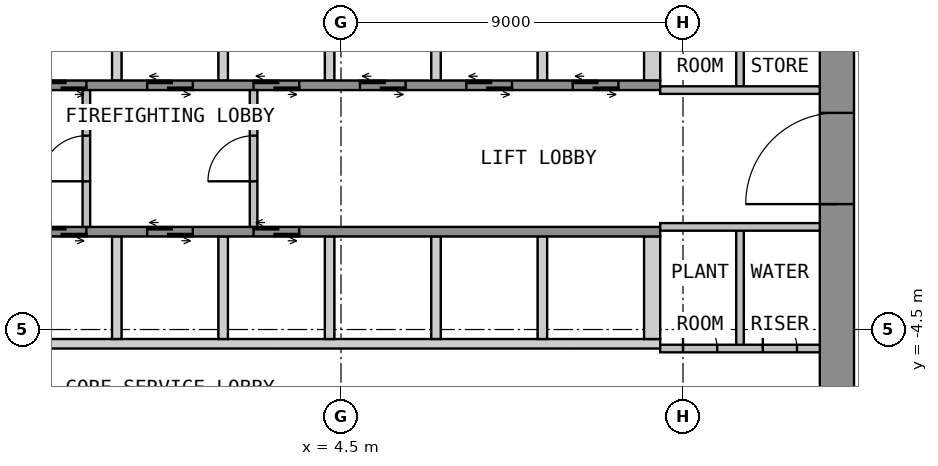
"""IFC4 building model, lengths in metres.
Left out: names, types, materials, properties, quantities, classifications, styles, units other than length and angle.
Written with IfcOpenShell. Run it as: python <this file> out.ifc"""

import sys

from ifc_helpers import new_model, si_unit, direction, frame, frame_2d, origin, place, context, subcontext, project, spatial, polyline, rectangle, outline, extrude, element, fill, save


model = new_model("IFC4")
c1 = context("Model", 3, precision=1e-05, world=origin(), true_north=direction((0.0, 1.0)))
c2 = subcontext(c1, "Body", "Model", "MODEL_VIEW")
j1 = project(units=[si_unit("LENGTHUNIT", "METRE"), si_unit("PLANEANGLEUNIT", "RADIAN")], contexts=[c1])
p1 = place(None, origin())
s1 = spatial("IfcSite", under=j1, at=p1, CompositionType="ELEMENT")
p2 = place(p1, origin())
s2 = spatial("IfcBuilding", under=s1, at=p2, CompositionType="ELEMENT")
p3 = place(p2, frame((0.0, 0.0, 81.3)))
s3 = spatial("IfcBuildingStorey", under=s2, at=p3, CompositionType="ELEMENT", Elevation=81.3)
p4 = place(p3, frame((17.55, -12.6, 0.0), z_axis=(0.0, 0.0, 1.0), x_axis=(0.0, 1.0, 0.0)))
e1 = element("IfcWall", 1, at=p4, inside=s3, PredefinedType="SHEAR", context=c2, shape_type="SweptSolid", body=[
    extrude(rectangle(XDim=25.2, YDim=0.9, at=frame_2d((12.6, 0.0))), origin(), (0.0, 0.0, 1.0), 3.525),
])
p5 = place(p4, frame((11.4, 0.0, 0.0)))
e2 = element("IfcOpeningElement", 2, at=p5, cuts=e1, PredefinedType="OPENING", context=c2, shape_type="SweptSolid", body=[
    extrude(rectangle(XDim=2.4, YDim=2.1, at=frame_2d((1.2, 1.05))), frame((0.0, 0.46, 0.0), z_axis=(0.0, -1.0, 0.0), x_axis=(1.0, 0.0, 0.0)), (0.0, 0.0, 1.0), 0.92),
])
p6 = place(p3, origin())
e3 = element("IfcWall", 3, at=p6, inside=s3, PredefinedType="SHEAR", context=c2, shape_type="SweptSolid", body=[
    extrude(outline(polyline([(-1.525, 2.05), (-1.275, 2.05), (-1.275, 4.75), (-1.525, 4.75), (-1.525, 2.05)])), origin(), (0.0, 0.0, 1.0), 3.525),
])
p7 = place(p3, origin())
e4 = element("IfcWall", 4, at=p7, inside=s3, PredefinedType="SHEAR", context=c2, shape_type="SweptSolid", body=[
    extrude(outline(polyline([(1.275, 2.05), (1.525, 2.05), (1.525, 4.75), (1.275, 4.75), (1.275, 2.05)])), origin(), (0.0, 0.0, 1.0), 3.525),
])
p8 = place(p3, origin())
e5 = element("IfcWall", 5, at=p8, inside=s3, PredefinedType="SHEAR", context=c2, shape_type="SweptSolid", body=[
    extrude(outline(polyline([(4.075, 2.05), (4.325, 2.05), (4.325, 4.75), (4.075, 4.75), (4.075, 2.05)])), origin(), (0.0, 0.0, 1.0), 3.525),
])
p9 = place(p3, origin())
e6 = element("IfcWall", 6, at=p9, inside=s3, PredefinedType="SHEAR", context=c2, shape_type="SweptSolid", body=[
    extrude(outline(polyline([(6.875, 2.05), (7.125, 2.05), (7.125, 4.75), (6.875, 4.75), (6.875, 2.05)])), origin(), (0.0, 0.0, 1.0), 3.525),
])
p10 = place(p3, origin())
e7 = element("IfcWall", 7, at=p10, inside=s3, PredefinedType="SHEAR", context=c2, shape_type="SweptSolid", body=[
    extrude(outline(polyline([(9.675, 2.05), (9.925, 2.05), (9.925, 4.75), (9.675, 4.75), (9.675, 2.05)])), origin(), (0.0, 0.0, 1.0), 3.525),
])
p11 = place(p3, origin())
e8 = element("IfcWall", 8, at=p11, inside=s3, PredefinedType="SHEAR", context=c2, shape_type="SweptSolid", body=[
    extrude(outline(polyline([(12.475, 2.05), (12.9, 2.05), (12.9, 4.75), (12.475, 4.75), (12.475, 2.05)])), origin(), (0.0, 0.0, 1.0), 3.525),
])
p12 = place(p3, frame((-12.9, 1.925, 0.0), z_axis=(0.0, 0.0, 1.0), x_axis=(1.0, 0.0, 0.0)))
e9 = element("IfcWall", 9, at=p12, inside=s3, PredefinedType="SHEAR", context=c2, shape_type="SweptSolid", body=[
    extrude(rectangle(XDim=25.8, YDim=0.25, at=frame_2d((12.9, 0.0))), origin(), (0.0, 0.0, 1.0), 3.525),
])
p13 = place(p12, frame((9.5, 0.0, 0.0)))
e10 = element("IfcOpeningElement", 10, at=p13, cuts=e9, PredefinedType="OPENING", context=c2, shape_type="SweptSolid", body=[
    extrude(rectangle(XDim=1.2, YDim=2.1, at=frame_2d((0.6, 1.05))), frame((0.0, 0.135, 0.0), z_axis=(0.0, -1.0, 0.0), x_axis=(1.0, 0.0, 0.0)), (0.0, 0.0, 1.0), 0.27),
])
p14 = place(p12, frame((12.3, 0.0, 0.0)))
e11 = element("IfcOpeningElement", 11, at=p14, cuts=e9, PredefinedType="OPENING", context=c2, shape_type="SweptSolid", body=[
    extrude(rectangle(XDim=1.2, YDim=2.1, at=frame_2d((0.6, 1.05))), frame((0.0, 0.135, 0.0), z_axis=(0.0, -1.0, 0.0), x_axis=(1.0, 0.0, 0.0)), (0.0, 0.0, 1.0), 0.27),
])
p15 = place(p12, frame((15.1, 0.0, 0.0)))
e12 = element("IfcOpeningElement", 12, at=p15, cuts=e9, PredefinedType="OPENING", context=c2, shape_type="SweptSolid", body=[
    extrude(rectangle(XDim=1.2, YDim=2.1, at=frame_2d((0.6, 1.05))), frame((0.0, 0.135, 0.0), z_axis=(0.0, -1.0, 0.0), x_axis=(1.0, 0.0, 0.0)), (0.0, 0.0, 1.0), 0.27),
])
p16 = place(p12, frame((17.9, 0.0, 0.0)))
e13 = element("IfcOpeningElement", 13, at=p16, cuts=e9, PredefinedType="OPENING", context=c2, shape_type="SweptSolid", body=[
    extrude(rectangle(XDim=1.2, YDim=2.1, at=frame_2d((0.6, 1.05))), frame((0.0, 0.135, 0.0), z_axis=(0.0, -1.0, 0.0), x_axis=(1.0, 0.0, 0.0)), (0.0, 0.0, 1.0), 0.27),
])
p17 = place(p12, frame((20.7, 0.0, 0.0)))
e14 = element("IfcOpeningElement", 14, at=p17, cuts=e9, PredefinedType="OPENING", context=c2, shape_type="SweptSolid", body=[
    extrude(rectangle(XDim=1.2, YDim=2.1, at=frame_2d((0.6, 1.05))), frame((0.0, 0.135, 0.0), z_axis=(0.0, -1.0, 0.0), x_axis=(1.0, 0.0, 0.0)), (0.0, 0.0, 1.0), 0.27),
])
p18 = place(p12, frame((23.5, 0.0, 0.0)))
e15 = element("IfcOpeningElement", 15, at=p18, cuts=e9, PredefinedType="OPENING", context=c2, shape_type="SweptSolid", body=[
    extrude(rectangle(XDim=1.2, YDim=2.1, at=frame_2d((0.6, 1.05))), frame((0.0, 0.135, 0.0), z_axis=(0.0, -1.0, 0.0), x_axis=(1.0, 0.0, 0.0)), (0.0, 0.0, 1.0), 0.27),
])
p19 = place(p3, origin())
e16 = element("IfcWall", 16, at=p19, inside=s3, PredefinedType="SHEAR", context=c2, shape_type="SweptSolid", body=[
    extrude(outline(polyline([(-12.9, -5.0), (12.9, -5.0), (12.9, -4.75), (-12.9, -4.75), (-12.9, -5.0)])), origin(), (0.0, 0.0, 1.0), 3.525),
])
p20 = place(p3, origin())
e17 = element("IfcWall", 17, at=p20, inside=s3, PredefinedType="SHEAR", context=c2, shape_type="SweptSolid", body=[
    extrude(outline(polyline([(-1.525, -4.75), (-1.275, -4.75), (-1.275, -2.05), (-1.525, -2.05), (-1.525, -4.75)])), origin(), (0.0, 0.0, 1.0), 3.525),
])
p21 = place(p3, origin())
e18 = element("IfcWall", 18, at=p21, inside=s3, PredefinedType="SHEAR", context=c2, shape_type="SweptSolid", body=[
    extrude(outline(polyline([(1.275, -4.75), (1.525, -4.75), (1.525, -2.05), (1.275, -2.05), (1.275, -4.75)])), origin(), (0.0, 0.0, 1.0), 3.525),
])
p22 = place(p3, origin())
e19 = element("IfcWall", 19, at=p22, inside=s3, PredefinedType="SHEAR", context=c2, shape_type="SweptSolid", body=[
    extrude(outline(polyline([(4.075, -4.75), (4.325, -4.75), (4.325, -2.05), (4.075, -2.05), (4.075, -4.75)])), origin(), (0.0, 0.0, 1.0), 3.525),
])
p23 = place(p3, origin())
e20 = element("IfcWall", 20, at=p23, inside=s3, PredefinedType="SHEAR", context=c2, shape_type="SweptSolid", body=[
    extrude(outline(polyline([(6.875, -4.75), (7.125, -4.75), (7.125, -2.05), (6.875, -2.05), (6.875, -4.75)])), origin(), (0.0, 0.0, 1.0), 3.525),
])
p24 = place(p3, origin())
e21 = element("IfcWall", 21, at=p24, inside=s3, PredefinedType="SHEAR", context=c2, shape_type="SweptSolid", body=[
    extrude(outline(polyline([(9.675, -4.75), (9.925, -4.75), (9.925, -2.05), (9.675, -2.05), (9.675, -4.75)])), origin(), (0.0, 0.0, 1.0), 3.525),
])
p25 = place(p3, origin())
e22 = element("IfcWall", 22, at=p25, inside=s3, PredefinedType="SHEAR", context=c2, shape_type="SweptSolid", body=[
    extrude(outline(polyline([(12.475, -4.75), (12.9, -4.75), (12.9, -2.05), (12.475, -2.05), (12.475, -4.75)])), origin(), (0.0, 0.0, 1.0), 3.525),
])
p26 = place(p3, frame((-12.9, -1.925, 0.0), z_axis=(0.0, 0.0, 1.0), x_axis=(1.0, 0.0, 0.0)))
e23 = element("IfcWall", 23, at=p26, inside=s3, PredefinedType="SHEAR", context=c2, shape_type="SweptSolid", body=[
    extrude(rectangle(XDim=25.8, YDim=0.25, at=frame_2d((12.9, 0.0))), origin(), (0.0, 0.0, 1.0), 3.525),
])
p27 = place(p26, frame((1.1, 0.0, 0.0)))
e24 = element("IfcOpeningElement", 24, at=p27, cuts=e23, PredefinedType="OPENING", context=c2, shape_type="SweptSolid", body=[
    extrude(rectangle(XDim=1.2, YDim=2.1, at=frame_2d((0.6, 1.05))), frame((0.0, 0.135, 0.0), z_axis=(0.0, -1.0, 0.0), x_axis=(1.0, 0.0, 0.0)), (0.0, 0.0, 1.0), 0.27),
])
p28 = place(p26, frame((3.9, 0.0, 0.0)))
e25 = element("IfcOpeningElement", 25, at=p28, cuts=e23, PredefinedType="OPENING", context=c2, shape_type="SweptSolid", body=[
    extrude(rectangle(XDim=1.2, YDim=2.1, at=frame_2d((0.6, 1.05))), frame((0.0, 0.135, 0.0), z_axis=(0.0, -1.0, 0.0), x_axis=(1.0, 0.0, 0.0)), (0.0, 0.0, 1.0), 0.27),
])
p29 = place(p26, frame((6.7, 0.0, 0.0)))
e26 = element("IfcOpeningElement", 26, at=p29, cuts=e23, PredefinedType="OPENING", context=c2, shape_type="SweptSolid", body=[
    extrude(rectangle(XDim=1.2, YDim=2.1, at=frame_2d((0.6, 1.05))), frame((0.0, 0.135, 0.0), z_axis=(0.0, -1.0, 0.0), x_axis=(1.0, 0.0, 0.0)), (0.0, 0.0, 1.0), 0.27),
])
p30 = place(p26, frame((9.5, 0.0, 0.0)))
e27 = element("IfcOpeningElement", 27, at=p30, cuts=e23, PredefinedType="OPENING", context=c2, shape_type="SweptSolid", body=[
    extrude(rectangle(XDim=1.2, YDim=2.1, at=frame_2d((0.6, 1.05))), frame((0.0, 0.135, 0.0), z_axis=(0.0, -1.0, 0.0), x_axis=(1.0, 0.0, 0.0)), (0.0, 0.0, 1.0), 0.27),
])
p31 = place(p26, frame((12.3, 0.0, 0.0)))
e28 = element("IfcOpeningElement", 28, at=p31, cuts=e23, PredefinedType="OPENING", context=c2, shape_type="SweptSolid", body=[
    extrude(rectangle(XDim=1.2, YDim=2.1, at=frame_2d((0.6, 1.05))), frame((0.0, 0.135, 0.0), z_axis=(0.0, -1.0, 0.0), x_axis=(1.0, 0.0, 0.0)), (0.0, 0.0, 1.0), 0.27),
])
p32 = place(p26, frame((15.1, 0.0, 0.0)))
e29 = element("IfcOpeningElement", 29, at=p32, cuts=e23, PredefinedType="OPENING", context=c2, shape_type="SweptSolid", body=[
    extrude(rectangle(XDim=1.2, YDim=2.1, at=frame_2d((0.6, 1.05))), frame((0.0, 0.135, 0.0), z_axis=(0.0, -1.0, 0.0), x_axis=(1.0, 0.0, 0.0)), (0.0, 0.0, 1.0), 0.27),
])
p33 = place(p3, frame((-2.2, -1.8, 0.0), z_axis=(0.0, 0.0, 1.0), x_axis=(0.0, 1.0, 0.0)))
e30 = element("IfcWall", 30, at=p33, inside=s3, PredefinedType="PARTITIONING", context=c2, shape_type="SweptSolid", body=[
    extrude(rectangle(XDim=3.6, YDim=0.2, at=frame_2d((1.8, 0.0))), origin(), (0.0, 0.0, 1.0), 3.525),
])
p34 = place(p33, frame((1.2, 0.0, 0.0)))
e31 = element("IfcOpeningElement", 31, at=p34, cuts=e30, PredefinedType="OPENING", context=c2, shape_type="SweptSolid", body=[
    extrude(rectangle(XDim=1.2, YDim=2.1, at=frame_2d((0.6, 1.05))), frame((0.0, 0.11, 0.0), z_axis=(0.0, -1.0, 0.0), x_axis=(1.0, 0.0, 0.0)), (0.0, 0.0, 1.0), 0.22),
])
p35 = place(p3, frame((2.2, -1.8, 0.0), z_axis=(0.0, 0.0, 1.0), x_axis=(0.0, 1.0, 0.0)))
e32 = element("IfcWall", 32, at=p35, inside=s3, PredefinedType="PARTITIONING", context=c2, shape_type="SweptSolid", body=[
    extrude(rectangle(XDim=3.6, YDim=0.2, at=frame_2d((1.8, 0.0))), origin(), (0.0, 0.0, 1.0), 3.525),
])
p36 = place(p35, frame((1.2, 0.0, 0.0)))
e33 = element("IfcOpeningElement", 33, at=p36, cuts=e32, PredefinedType="OPENING", context=c2, shape_type="SweptSolid", body=[
    extrude(rectangle(XDim=1.2, YDim=2.1, at=frame_2d((0.6, 1.05))), frame((0.0, 0.11, 0.0), z_axis=(0.0, -1.0, 0.0), x_axis=(1.0, 0.0, 0.0)), (0.0, 0.0, 1.0), 0.22),
])
p37 = place(p3, frame((15.0, 1.8, 0.0), z_axis=(0.0, 0.0, 1.0), x_axis=(0.0, 1.0, 0.0)))
e34 = element("IfcWall", 34, at=p37, inside=s3, PredefinedType="PARTITIONING", context=c2, shape_type="SweptSolid", body=[
    extrude(rectangle(XDim=3.2, YDim=0.2, at=frame_2d((1.6, 0.0))), origin(), (0.0, 0.0, 1.0), 3.525),
])
p38 = place(p3, frame((12.9, 1.8, 0.0), z_axis=(0.0, 0.0, 1.0), x_axis=(1.0, 0.0, 0.0)))
e35 = element("IfcWall", 35, at=p38, inside=s3, PredefinedType="PARTITIONING", context=c2, shape_type="SweptSolid", body=[
    extrude(rectangle(XDim=4.2, YDim=0.2, at=frame_2d((2.1, 0.0))), origin(), (0.0, 0.0, 1.0), 3.525),
])
p39 = place(p3, frame((15.0, -5.0, 0.0), z_axis=(0.0, 0.0, 1.0), x_axis=(0.0, 1.0, 0.0)))
e36 = element("IfcWall", 36, at=p39, inside=s3, PredefinedType="PARTITIONING", context=c2, shape_type="SweptSolid", body=[
    extrude(rectangle(XDim=3.2, YDim=0.2, at=frame_2d((1.6, 0.0))), origin(), (0.0, 0.0, 1.0), 3.525),
])
p40 = place(p3, frame((12.9, -5.0, 0.0), z_axis=(0.0, 0.0, 1.0), x_axis=(1.0, 0.0, 0.0)))
e37 = element("IfcWall", 37, at=p40, inside=s3, PredefinedType="PARTITIONING", context=c2, shape_type="SweptSolid", body=[
    extrude(rectangle(XDim=4.2, YDim=0.2, at=frame_2d((2.1, 0.0))), origin(), (0.0, 0.0, 1.0), 3.525),
])
p41 = place(p40, frame((0.6, 0.0, 0.0)))
e38 = element("IfcOpeningElement", 38, at=p41, cuts=e37, PredefinedType="OPENING", context=c2, shape_type="SweptSolid", body=[
    extrude(rectangle(XDim=0.9, YDim=2.1, at=frame_2d((0.45, 1.05))), frame((0.0, 0.11, 0.0), z_axis=(0.0, -1.0, 0.0), x_axis=(1.0, 0.0, 0.0)), (0.0, 0.0, 1.0), 0.22),
])
p42 = place(p40, frame((2.7, 0.0, 0.0)))
e39 = element("IfcOpeningElement", 39, at=p42, cuts=e37, PredefinedType="OPENING", context=c2, shape_type="SweptSolid", body=[
    extrude(rectangle(XDim=0.9, YDim=2.1, at=frame_2d((0.45, 1.05))), frame((0.0, 0.11, 0.0), z_axis=(0.0, -1.0, 0.0), x_axis=(1.0, 0.0, 0.0)), (0.0, 0.0, 1.0), 0.22),
])
p43 = place(p3, frame((12.9, -1.8, 0.0), z_axis=(0.0, 0.0, 1.0), x_axis=(1.0, 0.0, 0.0)))
e40 = element("IfcWall", 40, at=p43, inside=s3, PredefinedType="PARTITIONING", context=c2, shape_type="SweptSolid", body=[
    extrude(rectangle(XDim=4.2, YDim=0.2, at=frame_2d((2.1, 0.0))), origin(), (0.0, 0.0, 1.0), 3.525),
])
p44 = place(p5, origin())
e41 = element("IfcDoor", 41, at=p44, inside=s3, OperationType="DOUBLE_DOOR_DOUBLE_SWING", PredefinedType="DOOR", context=c2, shape_type="SweptSolid", body=[
    extrude(rectangle(XDim=2.4, YDim=2.1, at=frame_2d((1.2, 1.05))), frame((0.0, 0.025, 0.0), z_axis=(0.0, -1.0, 0.0), x_axis=(1.0, 0.0, 0.0)), (0.0, 0.0, 1.0), 0.05),
])
fill(e2, e41)
p45 = place(p13, origin())
e42 = element("IfcDoor", 42, at=p45, inside=s3, OperationType="DOUBLE_DOOR_SLIDING", PredefinedType="DOOR", context=c2, shape_type="SweptSolid", body=[
    extrude(rectangle(XDim=1.2, YDim=2.1, at=frame_2d((0.6, 1.05))), frame((0.0, 0.025, 0.0), z_axis=(0.0, -1.0, 0.0), x_axis=(1.0, 0.0, 0.0)), (0.0, 0.0, 1.0), 0.05),
])
fill(e10, e42)
p46 = place(p14, origin())
e43 = element("IfcDoor", 43, at=p46, inside=s3, OperationType="DOUBLE_DOOR_SLIDING", PredefinedType="DOOR", context=c2, shape_type="SweptSolid", body=[
    extrude(rectangle(XDim=1.2, YDim=2.1, at=frame_2d((0.6, 1.05))), frame((0.0, 0.025, 0.0), z_axis=(0.0, -1.0, 0.0), x_axis=(1.0, 0.0, 0.0)), (0.0, 0.0, 1.0), 0.05),
])
fill(e11, e43)
p47 = place(p15, origin())
e44 = element("IfcDoor", 44, at=p47, inside=s3, OperationType="DOUBLE_DOOR_SLIDING", PredefinedType="DOOR", context=c2, shape_type="SweptSolid", body=[
    extrude(rectangle(XDim=1.2, YDim=2.1, at=frame_2d((0.6, 1.05))), frame((0.0, 0.025, 0.0), z_axis=(0.0, -1.0, 0.0), x_axis=(1.0, 0.0, 0.0)), (0.0, 0.0, 1.0), 0.05),
])
fill(e12, e44)
p48 = place(p16, origin())
e45 = element("IfcDoor", 45, at=p48, inside=s3, OperationType="DOUBLE_DOOR_SLIDING", PredefinedType="DOOR", context=c2, shape_type="SweptSolid", body=[
    extrude(rectangle(XDim=1.2, YDim=2.1, at=frame_2d((0.6, 1.05))), frame((0.0, 0.025, 0.0), z_axis=(0.0, -1.0, 0.0), x_axis=(1.0, 0.0, 0.0)), (0.0, 0.0, 1.0), 0.05),
])
fill(e13, e45)
p49 = place(p17, origin())
e46 = element("IfcDoor", 46, at=p49, inside=s3, OperationType="DOUBLE_DOOR_SLIDING", PredefinedType="DOOR", context=c2, shape_type="SweptSolid", body=[
    extrude(rectangle(XDim=1.2, YDim=2.1, at=frame_2d((0.6, 1.05))), frame((0.0, 0.025, 0.0), z_axis=(0.0, -1.0, 0.0), x_axis=(1.0, 0.0, 0.0)), (0.0, 0.0, 1.0), 0.05),
])
fill(e14, e46)
p50 = place(p18, origin())
e47 = element("IfcDoor", 47, at=p50, inside=s3, OperationType="DOUBLE_DOOR_SLIDING", PredefinedType="DOOR", context=c2, shape_type="SweptSolid", body=[
    extrude(rectangle(XDim=1.2, YDim=2.1, at=frame_2d((0.6, 1.05))), frame((0.0, 0.025, 0.0), z_axis=(0.0, -1.0, 0.0), x_axis=(1.0, 0.0, 0.0)), (0.0, 0.0, 1.0), 0.05),
])
fill(e15, e47)
p51 = place(p30, origin())
e48 = element("IfcDoor", 48, at=p51, inside=s3, OperationType="DOUBLE_DOOR_SLIDING", PredefinedType="DOOR", context=c2, shape_type="SweptSolid", body=[
    extrude(rectangle(XDim=1.2, YDim=2.1, at=frame_2d((0.6, 1.05))), frame((0.0, 0.025, 0.0), z_axis=(0.0, -1.0, 0.0), x_axis=(1.0, 0.0, 0.0)), (0.0, 0.0, 1.0), 0.05),
])
fill(e27, e48)
p52 = place(p31, origin())
e49 = element("IfcDoor", 49, at=p52, inside=s3, OperationType="DOUBLE_DOOR_SLIDING", PredefinedType="DOOR", context=c2, shape_type="SweptSolid", body=[
    extrude(rectangle(XDim=1.2, YDim=2.1, at=frame_2d((0.6, 1.05))), frame((0.0, 0.025, 0.0), z_axis=(0.0, -1.0, 0.0), x_axis=(1.0, 0.0, 0.0)), (0.0, 0.0, 1.0), 0.05),
])
fill(e28, e49)
p53 = place(p32, origin())
e50 = element("IfcDoor", 50, at=p53, inside=s3, OperationType="DOUBLE_DOOR_SLIDING", PredefinedType="DOOR", context=c2, shape_type="SweptSolid", body=[
    extrude(rectangle(XDim=1.2, YDim=2.1, at=frame_2d((0.6, 1.05))), frame((0.0, 0.025, 0.0), z_axis=(0.0, -1.0, 0.0), x_axis=(1.0, 0.0, 0.0)), (0.0, 0.0, 1.0), 0.05),
])
fill(e29, e50)
p54 = place(p34, origin())
e51 = element("IfcDoor", 51, at=p54, inside=s3, OperationType="SINGLE_SWING_LEFT", PredefinedType="DOOR", context=c2, shape_type="SweptSolid", body=[
    extrude(rectangle(XDim=1.2, YDim=2.1, at=frame_2d((0.6, 1.05))), frame((0.0, 0.025, 0.0), z_axis=(0.0, -1.0, 0.0), x_axis=(1.0, 0.0, 0.0)), (0.0, 0.0, 1.0), 0.05),
])
fill(e31, e51)
p55 = place(p36, origin())
e52 = element("IfcDoor", 52, at=p55, inside=s3, OperationType="SINGLE_SWING_LEFT", PredefinedType="DOOR", context=c2, shape_type="SweptSolid", body=[
    extrude(rectangle(XDim=1.2, YDim=2.1, at=frame_2d((0.6, 1.05))), frame((0.0, 0.025, 0.0), z_axis=(0.0, -1.0, 0.0), x_axis=(1.0, 0.0, 0.0)), (0.0, 0.0, 1.0), 0.05),
])
fill(e33, e52)
p56 = place(p41, origin())
e53 = element("IfcDoor", 53, at=p56, inside=s3, OperationType="SINGLE_SWING_LEFT", PredefinedType="DOOR", context=c2, shape_type="SweptSolid", body=[
    extrude(rectangle(XDim=0.9, YDim=2.1, at=frame_2d((0.45, 1.05))), frame((0.0, 0.025, 0.0), z_axis=(0.0, -1.0, 0.0), x_axis=(1.0, 0.0, 0.0)), (0.0, 0.0, 1.0), 0.05),
])
fill(e38, e53)
p57 = place(p42, origin())
e54 = element("IfcDoor", 54, at=p57, inside=s3, OperationType="SINGLE_SWING_LEFT", PredefinedType="DOOR", context=c2, shape_type="SweptSolid", body=[
    extrude(rectangle(XDim=0.9, YDim=2.1, at=frame_2d((0.45, 1.05))), frame((0.0, 0.025, 0.0), z_axis=(0.0, -1.0, 0.0), x_axis=(1.0, 0.0, 0.0)), (0.0, 0.0, 1.0), 0.05),
])
fill(e39, e54)
save(model, sys.argv[1])
